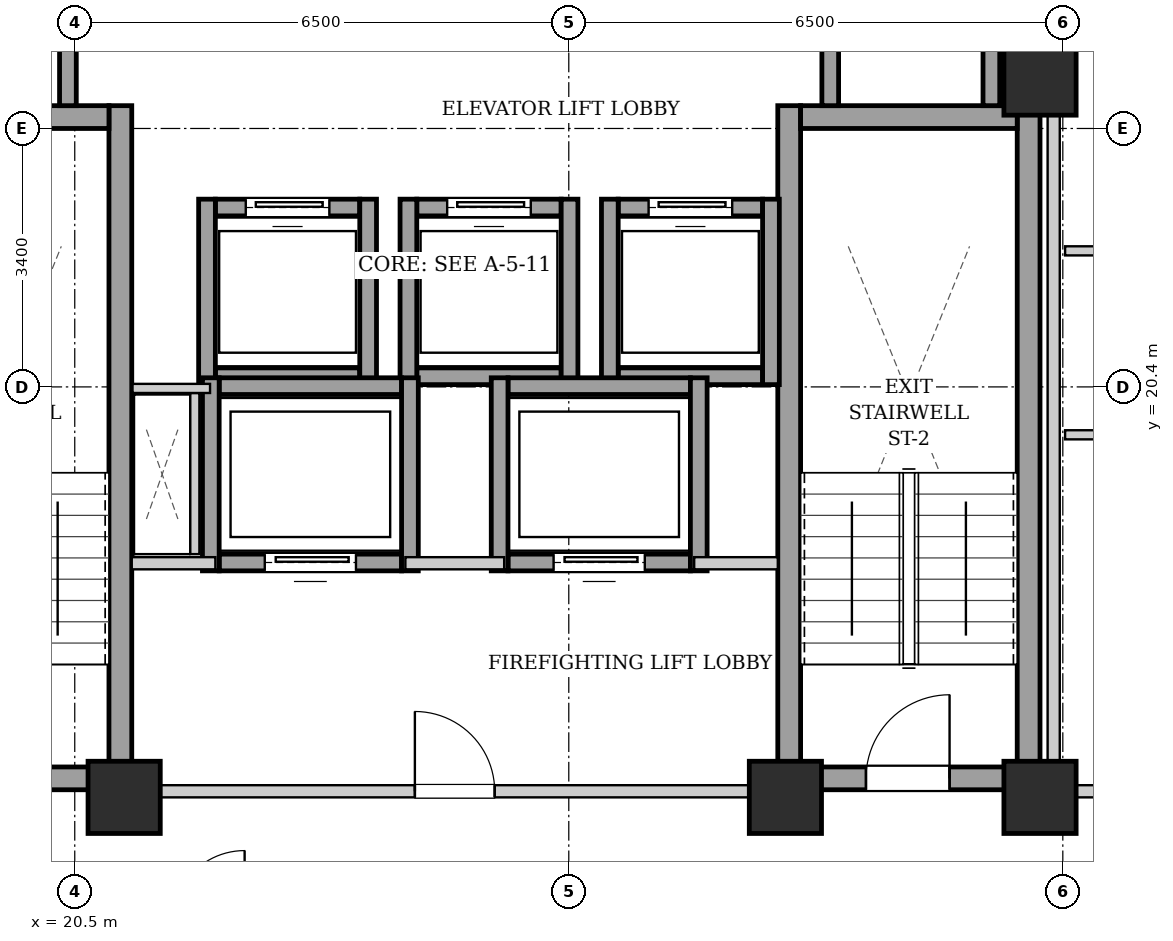
"""IFC4 building model, lengths in metres.
Left out: names, types, materials, properties, quantities, classifications, styles, units other than length and angle.
Written with IfcOpenShell. Run it as: python <this file> out.ifc"""

import sys

from ifc_helpers import new_model, si_unit, direction, frame, frame_2d, origin, origin_2d, place, context, subcontext, project, spatial, rectangle, extrude, element, fill, save


model = new_model("IFC4")
c1 = context("Model", 3, precision=1e-05, world=origin(), true_north=direction((0.0, 1.0)))
c2 = subcontext(c1, "Body", "Model", "MODEL_VIEW")
j1 = project(units=[si_unit("LENGTHUNIT", "METRE"), si_unit("PLANEANGLEUNIT", "RADIAN")], contexts=[c1])
p1 = place(None, origin())
s1 = spatial("IfcSite", under=j1, at=p1, CompositionType="ELEMENT")
p2 = place(p1, origin())
s2 = spatial("IfcBuilding", under=s1, at=p2, CompositionType="ELEMENT")
p3 = place(p2, frame((0.0, 0.0, 140.65)))
s3 = spatial("IfcBuildingStorey", under=s2, at=p3, CompositionType="ELEMENT", Elevation=140.65)
for number, where, z_axis, x_axis in (
    (1, (21.15, 15.0, 0.0), (0.0, 0.0, 1.0), (1.0, 0.0, 0.0)),
    (2, (29.85, 15.0, 0.0), (0.0, 0.0, 1.0), (1.0, 0.0, 0.0)),
    (3, (33.2, 15.0, 0.0), (0.0, 0.0, 1.0), (1.0, 0.0, 0.0)),
    (4, (33.2, 24.45, 0.0), (0.0, 0.0, 1.0), (1.0, 0.0, 0.0)),
):
    element("IfcColumn", number, at=place(p3, frame(where, z_axis=z_axis, x_axis=x_axis)), inside=s3, PredefinedType="COLUMN", context=c2, shape_type="SweptSolid", body=[
        extrude(rectangle(XDim=0.95, YDim=0.95, at=origin_2d()), origin(), (0.0, 0.0, 1.0), 3.25),
    ])
p4 = place(p3, frame((21.1, 15.1, 0.0), z_axis=(0.0, 0.0, 1.0), x_axis=(0.0, 1.0, 0.0)))
e5 = element("IfcWall", 5, at=p4, inside=s3, PredefinedType="SHEAR", context=c2, shape_type="SweptSolid", body=[
    extrude(rectangle(XDim=9.0, YDim=0.3, at=frame_2d((4.5, 0.0))), origin(), (0.0, 0.0, 1.0), 2.99),
])
p5 = place(p3, frame((18.1, 23.95, 0.0), z_axis=(0.0, 0.0, 1.0), x_axis=(1.0, 0.0, 0.0)))
e6 = element("IfcWall", 6, at=p5, inside=s3, PredefinedType="SHEAR", context=c2, shape_type="SweptSolid", body=[
    extrude(rectangle(XDim=2.85, YDim=0.3, at=frame_2d((1.425, 0.0))), origin(), (0.0, 0.0, 1.0), 2.99),
])
p6 = place(p3, frame((18.1, 15.25, 0.0), z_axis=(0.0, 0.0, 1.0), x_axis=(1.0, 0.0, 0.0)))
e7 = element("IfcWall", 7, at=p6, inside=s3, PredefinedType="SHEAR", context=c2, shape_type="SweptSolid", body=[
    extrude(rectangle(XDim=2.85, YDim=0.3, at=frame_2d((1.425, 0.0))), origin(), (0.0, 0.0, 1.0), 2.99),
])
p7 = place(p6, frame((0.86, 0.0, 0.0)))
e8 = element("IfcOpeningElement", 8, at=p7, cuts=e7, PredefinedType="OPENING", context=c2, shape_type="SweptSolid", body=[
    extrude(rectangle(XDim=1.1, YDim=2.05, at=frame_2d((0.55, 1.025))), frame((0.0, 0.16, 0.0), z_axis=(0.0, -1.0, 0.0), x_axis=(1.0, 0.0, 0.0)), (0.0, 0.0, 1.0), 0.32),
])
for number, where, z_axis, x_axis in (
    (9, (29.9, 15.1, 0.0), (0.0, 0.0, 1.0), (0.0, 1.0, 0.0)),
    (10, (33.05, 15.1, 0.0), (0.0, 0.0, 1.0), (0.0, 1.0, 0.0)),
):
    element("IfcWall", number, at=place(p3, frame(where, z_axis=z_axis, x_axis=x_axis)), inside=s3, PredefinedType="SHEAR", context=c2, shape_type="SweptSolid", body=[
        extrude(rectangle(XDim=9.0, YDim=0.3, at=frame_2d((4.5, 0.0))), origin(), (0.0, 0.0, 1.0), 2.99),
    ])
p8 = place(p3, frame((30.05, 23.95, 0.0), z_axis=(0.0, 0.0, 1.0), x_axis=(1.0, 0.0, 0.0)))
e11 = element("IfcWall", 11, at=p8, inside=s3, PredefinedType="SHEAR", context=c2, shape_type="SweptSolid", body=[
    extrude(rectangle(XDim=2.85, YDim=0.3, at=frame_2d((1.425, 0.0))), origin(), (0.0, 0.0, 1.0), 2.99),
])
p9 = place(p3, frame((30.05, 15.25, 0.0), z_axis=(0.0, 0.0, 1.0), x_axis=(1.0, 0.0, 0.0)))
e12 = element("IfcWall", 12, at=p9, inside=s3, PredefinedType="SHEAR", context=c2, shape_type="SweptSolid", body=[
    extrude(rectangle(XDim=2.85, YDim=0.3, at=frame_2d((1.425, 0.0))), origin(), (0.0, 0.0, 1.0), 2.99),
])
p10 = place(p9, frame((0.86, 0.0, 0.0)))
e13 = element("IfcOpeningElement", 13, at=p10, cuts=e12, PredefinedType="OPENING", context=c2, shape_type="SweptSolid", body=[
    extrude(rectangle(XDim=1.1, YDim=2.05, at=frame_2d((0.55, 1.025))), frame((0.0, 0.16, 0.0), z_axis=(0.0, -1.0, 0.0), x_axis=(1.0, 0.0, 0.0)), (0.0, 0.0, 1.0), 0.32),
])
p11 = place(p3, frame((22.35, 20.54, 0.0), z_axis=(0.0, 0.0, 1.0), x_axis=(1.0, 0.0, 0.0)))
e14 = element("IfcWall", 14, at=p11, inside=s3, PredefinedType="SHEAR", context=c2, shape_type="SweptSolid", body=[
    extrude(rectangle(XDim=1.9, YDim=0.22, at=frame_2d((0.95, 0.0))), origin(), (0.0, 0.0, 1.0), 2.99),
])
p12 = place(p3, frame((22.35, 22.76, 0.0), z_axis=(0.0, 0.0, 1.0), x_axis=(1.0, 0.0, 0.0)))
e15 = element("IfcWall", 15, at=p12, inside=s3, PredefinedType="SHEAR", context=c2, shape_type="SweptSolid", body=[
    extrude(rectangle(XDim=1.9, YDim=0.22, at=frame_2d((0.95, 0.0))), origin(), (0.0, 0.0, 1.0), 2.99),
])
p13 = place(p12, frame((0.4, 0.0, 0.0)))
e16 = element("IfcOpeningElement", 16, at=p13, cuts=e15, PredefinedType="OPENING", context=c2, shape_type="SweptSolid", body=[
    extrude(rectangle(XDim=1.1, YDim=2.15, at=frame_2d((0.55, 1.075))), frame((0.0, 0.12, 0.0), z_axis=(0.0, -1.0, 0.0), x_axis=(1.0, 0.0, 0.0)), (0.0, 0.0, 1.0), 0.24),
])
for number, where, z_axis, x_axis in (
    (17, (22.24, 20.43, 0.0), (0.0, 0.0, 1.0), (0.0, 1.0, 0.0)),
    (18, (24.36, 20.43, 0.0), (0.0, 0.0, 1.0), (0.0, 1.0, 0.0)),
):
    element("IfcWall", number, at=place(p3, frame(where, z_axis=z_axis, x_axis=x_axis)), inside=s3, PredefinedType="SHEAR", context=c2, shape_type="SweptSolid", body=[
        extrude(rectangle(XDim=2.44, YDim=0.22, at=frame_2d((1.22, 0.0))), origin(), (0.0, 0.0, 1.0), 2.99),
    ])
p14 = place(p3, frame((25.0, 20.54, 0.0), z_axis=(0.0, 0.0, 1.0), x_axis=(1.0, 0.0, 0.0)))
e19 = element("IfcWall", 19, at=p14, inside=s3, PredefinedType="SHEAR", context=c2, shape_type="SweptSolid", body=[
    extrude(rectangle(XDim=1.9, YDim=0.22, at=frame_2d((0.95, 0.0))), origin(), (0.0, 0.0, 1.0), 2.99),
])
p15 = place(p3, frame((25.0, 22.76, 0.0), z_axis=(0.0, 0.0, 1.0), x_axis=(1.0, 0.0, 0.0)))
e20 = element("IfcWall", 20, at=p15, inside=s3, PredefinedType="SHEAR", context=c2, shape_type="SweptSolid", body=[
    extrude(rectangle(XDim=1.9, YDim=0.22, at=frame_2d((0.95, 0.0))), origin(), (0.0, 0.0, 1.0), 2.99),
])
p16 = place(p15, frame((0.4, 0.0, 0.0)))
e21 = element("IfcOpeningElement", 21, at=p16, cuts=e20, PredefinedType="OPENING", context=c2, shape_type="SweptSolid", body=[
    extrude(rectangle(XDim=1.1, YDim=2.15, at=frame_2d((0.55, 1.075))), frame((0.0, 0.12, 0.0), z_axis=(0.0, -1.0, 0.0), x_axis=(1.0, 0.0, 0.0)), (0.0, 0.0, 1.0), 0.24),
])
for number, where, z_axis, x_axis in (
    (22, (24.89, 20.43, 0.0), (0.0, 0.0, 1.0), (0.0, 1.0, 0.0)),
    (23, (27.01, 20.43, 0.0), (0.0, 0.0, 1.0), (0.0, 1.0, 0.0)),
):
    element("IfcWall", number, at=place(p3, frame(where, z_axis=z_axis, x_axis=x_axis)), inside=s3, PredefinedType="SHEAR", context=c2, shape_type="SweptSolid", body=[
        extrude(rectangle(XDim=2.44, YDim=0.22, at=frame_2d((1.22, 0.0))), origin(), (0.0, 0.0, 1.0), 2.99),
    ])
p17 = place(p3, frame((27.65, 20.54, 0.0), z_axis=(0.0, 0.0, 1.0), x_axis=(1.0, 0.0, 0.0)))
e24 = element("IfcWall", 24, at=p17, inside=s3, PredefinedType="SHEAR", context=c2, shape_type="SweptSolid", body=[
    extrude(rectangle(XDim=1.9, YDim=0.22, at=frame_2d((0.95, 0.0))), origin(), (0.0, 0.0, 1.0), 2.99),
])
p18 = place(p3, frame((27.65, 22.76, 0.0), z_axis=(0.0, 0.0, 1.0), x_axis=(1.0, 0.0, 0.0)))
e25 = element("IfcWall", 25, at=p18, inside=s3, PredefinedType="SHEAR", context=c2, shape_type="SweptSolid", body=[
    extrude(rectangle(XDim=1.9, YDim=0.22, at=frame_2d((0.95, 0.0))), origin(), (0.0, 0.0, 1.0), 2.99),
])
p19 = place(p18, frame((0.4, 0.0, 0.0)))
e26 = element("IfcOpeningElement", 26, at=p19, cuts=e25, PredefinedType="OPENING", context=c2, shape_type="SweptSolid", body=[
    extrude(rectangle(XDim=1.1, YDim=2.15, at=frame_2d((0.55, 1.075))), frame((0.0, 0.12, 0.0), z_axis=(0.0, -1.0, 0.0), x_axis=(1.0, 0.0, 0.0)), (0.0, 0.0, 1.0), 0.24),
])
for number, where, z_axis, x_axis in (
    (27, (27.54, 20.43, 0.0), (0.0, 0.0, 1.0), (0.0, 1.0, 0.0)),
    (28, (29.66, 20.43, 0.0), (0.0, 0.0, 1.0), (0.0, 1.0, 0.0)),
):
    element("IfcWall", number, at=place(p3, frame(where, z_axis=z_axis, x_axis=x_axis)), inside=s3, PredefinedType="SHEAR", context=c2, shape_type="SweptSolid", body=[
        extrude(rectangle(XDim=2.44, YDim=0.22, at=frame_2d((1.22, 0.0))), origin(), (0.0, 0.0, 1.0), 2.99),
    ])
p20 = place(p3, frame((20.41, 24.1, 0.0), z_axis=(0.0, 0.0, 1.0), x_axis=(0.0, 1.0, 0.0)))
e29 = element("IfcWall", 29, at=p20, inside=s3, PredefinedType="SHEAR", context=c2, shape_type="SweptSolid", body=[
    extrude(rectangle(XDim=1.96, YDim=0.22, at=frame_2d((0.98, 0.0))), origin(), (0.0, 0.0, 1.0), 2.99),
])
for number, where, z_axis, x_axis in (
    (30, (30.44, 24.1, 0.0), (0.0, 0.0, 1.0), (0.0, 1.0, 0.0)),
    (31, (32.56, 24.1, 0.0), (0.0, 0.0, 1.0), (0.0, 1.0, 0.0)),
):
    element("IfcWall", number, at=place(p3, frame(where, z_axis=z_axis, x_axis=x_axis)), inside=s3, PredefinedType="SHEAR", context=c2, shape_type="SweptSolid", body=[
        extrude(rectangle(XDim=2.07, YDim=0.22, at=frame_2d((1.035, 0.0))), origin(), (0.0, 0.0, 1.0), 2.99),
    ])
p21 = place(p3, frame((22.4, 18.09, 0.0), z_axis=(0.0, 0.0, 1.0), x_axis=(1.0, 0.0, 0.0)))
e32 = element("IfcWall", 32, at=p21, inside=s3, PredefinedType="SHEAR", context=c2, shape_type="SweptSolid", body=[
    extrude(rectangle(XDim=2.4, YDim=0.22, at=frame_2d((1.2, 0.0))), origin(), (0.0, 0.0, 1.0), 2.99),
])
p22 = place(p21, frame((0.6, 0.0, 0.0)))
e33 = element("IfcOpeningElement", 33, at=p22, cuts=e32, PredefinedType="OPENING", context=c2, shape_type="SweptSolid", body=[
    extrude(rectangle(XDim=1.2, YDim=2.15, at=frame_2d((0.6, 1.075))), frame((0.0, 0.12, 0.0), z_axis=(0.0, -1.0, 0.0), x_axis=(1.0, 0.0, 0.0)), (0.0, 0.0, 1.0), 0.24),
])
p23 = place(p3, frame((22.4, 20.41, 0.0), z_axis=(0.0, 0.0, 1.0), x_axis=(1.0, 0.0, 0.0)))
e34 = element("IfcWall", 34, at=p23, inside=s3, PredefinedType="SHEAR", context=c2, shape_type="SweptSolid", body=[
    extrude(rectangle(XDim=2.4, YDim=0.22, at=frame_2d((1.2, 0.0))), origin(), (0.0, 0.0, 1.0), 2.99),
])
for number, where, z_axis, x_axis in (
    (35, (22.29, 17.98, 0.0), (0.0, 0.0, 1.0), (0.0, 1.0, 0.0)),
    (36, (24.91, 17.98, 0.0), (0.0, 0.0, 1.0), (0.0, 1.0, 0.0)),
):
    element("IfcWall", number, at=place(p3, frame(where, z_axis=z_axis, x_axis=x_axis)), inside=s3, PredefinedType="SHEAR", context=c2, shape_type="SweptSolid", body=[
        extrude(rectangle(XDim=2.54, YDim=0.22, at=frame_2d((1.27, 0.0))), origin(), (0.0, 0.0, 1.0), 2.99),
    ])
p24 = place(p3, frame((26.2, 18.09, 0.0), z_axis=(0.0, 0.0, 1.0), x_axis=(1.0, 0.0, 0.0)))
e37 = element("IfcWall", 37, at=p24, inside=s3, PredefinedType="SHEAR", context=c2, shape_type="SweptSolid", body=[
    extrude(rectangle(XDim=2.4, YDim=0.22, at=frame_2d((1.2, 0.0))), origin(), (0.0, 0.0, 1.0), 2.99),
])
p25 = place(p24, frame((0.6, 0.0, 0.0)))
e38 = element("IfcOpeningElement", 38, at=p25, cuts=e37, PredefinedType="OPENING", context=c2, shape_type="SweptSolid", body=[
    extrude(rectangle(XDim=1.2, YDim=2.15, at=frame_2d((0.6, 1.075))), frame((0.0, 0.12, 0.0), z_axis=(0.0, -1.0, 0.0), x_axis=(1.0, 0.0, 0.0)), (0.0, 0.0, 1.0), 0.24),
])
p26 = place(p3, frame((26.2, 20.41, 0.0), z_axis=(0.0, 0.0, 1.0), x_axis=(1.0, 0.0, 0.0)))
e39 = element("IfcWall", 39, at=p26, inside=s3, PredefinedType="SHEAR", context=c2, shape_type="SweptSolid", body=[
    extrude(rectangle(XDim=2.4, YDim=0.22, at=frame_2d((1.2, 0.0))), origin(), (0.0, 0.0, 1.0), 2.99),
])
for number, where, z_axis, x_axis in (
    (40, (26.09, 17.98, 0.0), (0.0, 0.0, 1.0), (0.0, 1.0, 0.0)),
    (41, (28.71, 17.98, 0.0), (0.0, 0.0, 1.0), (0.0, 1.0, 0.0)),
):
    element("IfcWall", number, at=place(p3, frame(where, z_axis=z_axis, x_axis=x_axis)), inside=s3, PredefinedType="SHEAR", context=c2, shape_type="SweptSolid", body=[
        extrude(rectangle(XDim=2.54, YDim=0.22, at=frame_2d((1.27, 0.0))), origin(), (0.0, 0.0, 1.0), 2.99),
    ])
p27 = place(p3, frame((21.25, 15.08, 0.0), z_axis=(0.0, 0.0, 1.0), x_axis=(1.0, 0.0, 0.0)))
e42 = element("IfcWall", 42, at=p27, inside=s3, PredefinedType="PARTITIONING", context=c2, shape_type="SweptSolid", body=[
    extrude(rectangle(XDim=8.5, YDim=0.16, at=frame_2d((4.25, 0.0))), origin(), (0.0, 0.0, 1.0), 2.426),
])
p28 = place(p27, frame((3.725, 0.0, 0.0)))
e43 = element("IfcOpeningElement", 43, at=p28, cuts=e42, PredefinedType="OPENING", context=c2, shape_type="SweptSolid", body=[
    extrude(rectangle(XDim=1.05, YDim=2.05, at=frame_2d((0.525, 1.025))), frame((0.0, 0.09, 0.0), z_axis=(0.0, -1.0, 0.0), x_axis=(1.0, 0.0, 0.0)), (0.0, 0.0, 1.0), 0.18),
])
p29 = place(p3, frame((21.25, 18.08, 0.0), z_axis=(0.0, 0.0, 1.0), x_axis=(1.0, 0.0, 0.0)))
e44 = element("IfcWall", 44, at=p29, inside=s3, PredefinedType="PARTITIONING", context=c2, shape_type="SweptSolid", body=[
    extrude(rectangle(XDim=1.1, YDim=0.16, at=frame_2d((0.55, 0.0))), origin(), (0.0, 0.0, 1.0), 2.99),
])
p30 = place(p3, frame((24.85, 18.08, 0.0), z_axis=(0.0, 0.0, 1.0), x_axis=(1.0, 0.0, 0.0)))
e45 = element("IfcWall", 45, at=p30, inside=s3, PredefinedType="PARTITIONING", context=c2, shape_type="SweptSolid", body=[
    extrude(rectangle(XDim=1.3, YDim=0.16, at=frame_2d((0.65, 0.0))), origin(), (0.0, 0.0, 1.0), 2.99),
])
p31 = place(p3, frame((28.65, 18.08, 0.0), z_axis=(0.0, 0.0, 1.0), x_axis=(1.0, 0.0, 0.0)))
e46 = element("IfcWall", 46, at=p31, inside=s3, PredefinedType="PARTITIONING", context=c2, shape_type="SweptSolid", body=[
    extrude(rectangle(XDim=1.1, YDim=0.16, at=frame_2d((0.55, 0.0))), origin(), (0.0, 0.0, 1.0), 2.99),
])
p32 = place(p3, frame((33.12, 24.12, 0.0), z_axis=(0.0, 0.0, 1.0), x_axis=(0.0, 1.0, 0.0)))
e47 = element("IfcWall", 47, at=p32, inside=s3, PredefinedType="PARTITIONING", context=c2, shape_type="SweptSolid", body=[
    extrude(rectangle(XDim=4.76, YDim=0.16, at=frame_2d((2.38, 0.0))), origin(), (0.0, 0.0, 1.0), 2.99),
])
p33 = place(p3, frame((22.08, 18.2, 0.0), z_axis=(0.0, 0.0, 1.0), x_axis=(0.0, 1.0, 0.0)))
e48 = element("IfcWall", 48, at=p33, inside=s3, PredefinedType="PARTITIONING", context=c2, shape_type="SweptSolid", body=[
    extrude(rectangle(XDim=2.12, YDim=0.12, at=frame_2d((1.06, 0.0))), origin(), (0.0, 0.0, 1.0), 2.99),
])
p34 = place(p3, frame((22.28, 20.38, 0.0), z_axis=(0.0, 0.0, 1.0), x_axis=(-1.0, 0.0, 0.0)))
e49 = element("IfcWall", 49, at=p34, inside=s3, PredefinedType="PARTITIONING", context=c2, shape_type="SweptSolid", body=[
    extrude(rectangle(XDim=1.02, YDim=0.12, at=frame_2d((0.51, 0.0))), origin(), (0.0, 0.0, 1.0), 2.99),
])
p35 = place(p3, frame((33.38, 15.08, 0.0), z_axis=(0.0, 0.0, 1.0), x_axis=(1.0, 0.0, 0.0)))
e50 = element("IfcWall", 50, at=p35, inside=s3, PredefinedType="PARTITIONING", context=c2, shape_type="SweptSolid", body=[
    extrude(rectangle(XDim=6.64, YDim=0.16, at=frame_2d((3.32, 0.0))), origin(), (0.0, 0.0, 1.0), 2.426),
])
p36 = place(p35, frame((0.9, 0.0, 0.0)))
e51 = element("IfcOpeningElement", 51, at=p36, cuts=e50, PredefinedType="OPENING", context=c2, shape_type="SweptSolid", body=[
    extrude(rectangle(XDim=0.95, YDim=2.1, at=frame_2d((0.475, 1.05))), frame((0.0, 0.09, 0.0), z_axis=(0.0, -1.0, 0.0), x_axis=(1.0, 0.0, 0.0)), (0.0, 0.0, 1.0), 0.18),
])
p37 = place(p3, frame((33.53, 22.19, 0.0), z_axis=(0.0, 0.0, 1.0), x_axis=(1.0, 0.0, 0.0)))
e52 = element("IfcWall", 52, at=p37, inside=s3, PredefinedType="PARTITIONING", context=c2, shape_type="SweptSolid", body=[
    extrude(rectangle(XDim=2.45, YDim=0.12, at=frame_2d((1.225, 0.0))), origin(), (0.0, 0.0, 1.0), 2.99),
])
p38 = place(p3, frame((33.53, 19.77, 0.0), z_axis=(0.0, 0.0, 1.0), x_axis=(1.0, 0.0, 0.0)))
e53 = element("IfcWall", 53, at=p38, inside=s3, PredefinedType="PARTITIONING", context=c2, shape_type="SweptSolid", body=[
    extrude(rectangle(XDim=2.45, YDim=0.12, at=frame_2d((1.225, 0.0))), origin(), (0.0, 0.0, 1.0), 2.99),
])
p39 = place(p38, frame((0.795, 0.0, 0.0)))
e54 = element("IfcOpeningElement", 54, at=p39, cuts=e53, PredefinedType="OPENING", context=c2, shape_type="SweptSolid", body=[
    extrude(rectangle(XDim=0.86, YDim=2.05, at=frame_2d((0.43, 1.025))), frame((0.0, 0.07, 0.0), z_axis=(0.0, -1.0, 0.0), x_axis=(1.0, 0.0, 0.0)), (0.0, 0.0, 1.0), 0.14),
])
p40 = place(p3, frame((33.38, 15.02, 0.0), z_axis=(0.0, 0.0, 1.0), x_axis=(0.0, 1.0, 0.0)))
e55 = element("IfcWall", 55, at=p40, inside=s3, PredefinedType="PARTITIONING", context=c2, shape_type="SweptSolid", body=[
    extrude(rectangle(XDim=13.98, YDim=0.16, at=frame_2d((6.99, 0.0))), origin(), (0.0, 0.0, 1.0), 2.99),
])
p41 = place(p10, origin())
e56 = element("IfcDoor", 56, at=p41, inside=s3, OperationType="SINGLE_SWING_RIGHT", PredefinedType="DOOR", context=c2, shape_type="SweptSolid", body=[
    extrude(rectangle(XDim=1.1, YDim=2.05, at=frame_2d((0.55, 1.025))), frame((0.0, 0.025, 0.0), z_axis=(0.0, -1.0, 0.0), x_axis=(1.0, 0.0, 0.0)), (0.0, 0.0, 1.0), 0.05),
])
fill(e13, e56)
p42 = place(p13, origin())
e57 = element("IfcDoor", 57, at=p42, inside=s3, OperationType="SLIDING_TO_LEFT", PredefinedType="DOOR", context=c2, shape_type="SweptSolid", body=[
    extrude(rectangle(XDim=1.1, YDim=2.15, at=frame_2d((0.55, 1.075))), frame((0.0, 0.025, 0.0), z_axis=(0.0, -1.0, 0.0), x_axis=(1.0, 0.0, 0.0)), (0.0, 0.0, 1.0), 0.05),
])
fill(e16, e57)
p43 = place(p16, origin())
e58 = element("IfcDoor", 58, at=p43, inside=s3, OperationType="SLIDING_TO_LEFT", PredefinedType="DOOR", context=c2, shape_type="SweptSolid", body=[
    extrude(rectangle(XDim=1.1, YDim=2.15, at=frame_2d((0.55, 1.075))), frame((0.0, 0.025, 0.0), z_axis=(0.0, -1.0, 0.0), x_axis=(1.0, 0.0, 0.0)), (0.0, 0.0, 1.0), 0.05),
])
fill(e21, e58)
p44 = place(p19, origin())
e59 = element("IfcDoor", 59, at=p44, inside=s3, OperationType="SLIDING_TO_LEFT", PredefinedType="DOOR", context=c2, shape_type="SweptSolid", body=[
    extrude(rectangle(XDim=1.1, YDim=2.15, at=frame_2d((0.55, 1.075))), frame((0.0, 0.025, 0.0), z_axis=(0.0, -1.0, 0.0), x_axis=(1.0, 0.0, 0.0)), (0.0, 0.0, 1.0), 0.05),
])
fill(e26, e59)
p45 = place(p22, origin())
e60 = element("IfcDoor", 60, at=p45, inside=s3, OperationType="SLIDING_TO_LEFT", PredefinedType="DOOR", context=c2, shape_type="SweptSolid", body=[
    extrude(rectangle(XDim=1.2, YDim=2.15, at=frame_2d((0.6, 1.075))), frame((0.0, 0.025, 0.0), z_axis=(0.0, -1.0, 0.0), x_axis=(1.0, 0.0, 0.0)), (0.0, 0.0, 1.0), 0.05),
])
fill(e33, e60)
p46 = place(p25, origin())
e61 = element("IfcDoor", 61, at=p46, inside=s3, OperationType="SLIDING_TO_LEFT", PredefinedType="DOOR", context=c2, shape_type="SweptSolid", body=[
    extrude(rectangle(XDim=1.2, YDim=2.15, at=frame_2d((0.6, 1.075))), frame((0.0, 0.025, 0.0), z_axis=(0.0, -1.0, 0.0), x_axis=(1.0, 0.0, 0.0)), (0.0, 0.0, 1.0), 0.05),
])
fill(e38, e61)
p47 = place(p28, origin())
e62 = element("IfcDoor", 62, at=p47, inside=s3, OperationType="SINGLE_SWING_LEFT", PredefinedType="DOOR", context=c2, shape_type="SweptSolid", body=[
    extrude(rectangle(XDim=1.05, YDim=2.05, at=frame_2d((0.525, 1.025))), frame((0.0, 0.025, 0.0), z_axis=(0.0, -1.0, 0.0), x_axis=(1.0, 0.0, 0.0)), (0.0, 0.0, 1.0), 0.05),
])
fill(e43, e62)
save(model, sys.argv[1])
